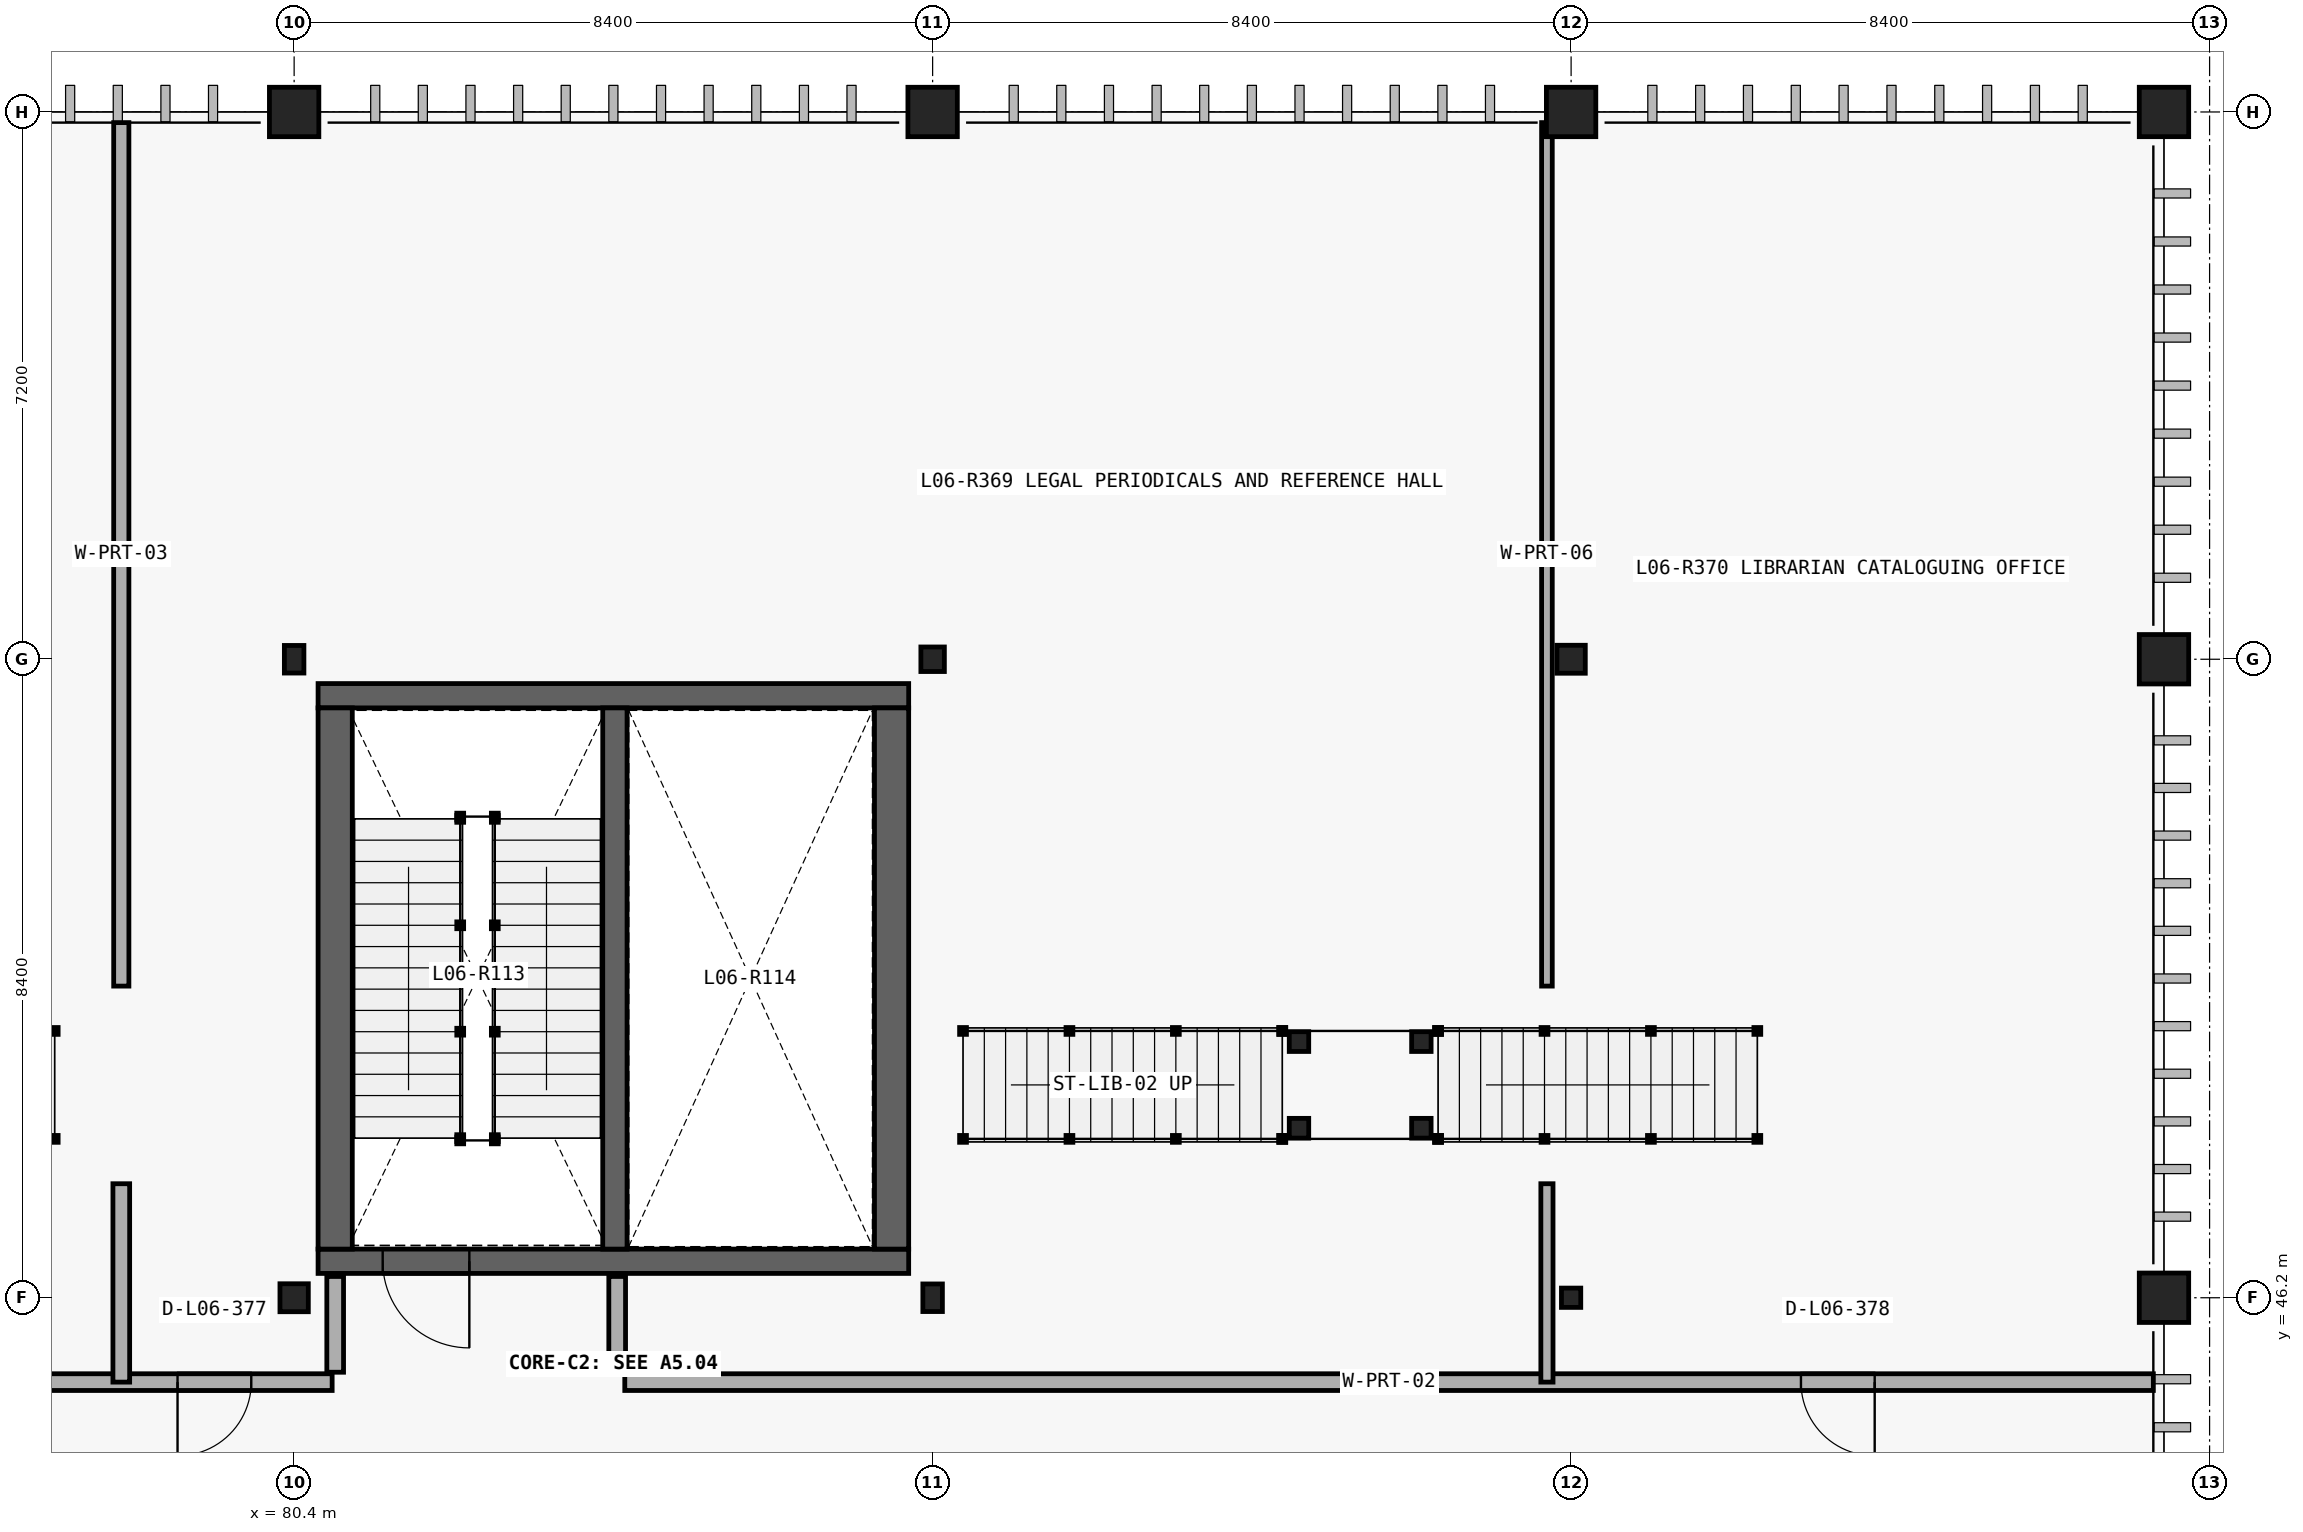
"""IFC4 building model, lengths in metres.
Left out: names, types, materials, properties, quantities, classifications, styles, units other than length and angle.
Written with IfcOpenShell. Run it as: python <this file> out.ifc"""

import sys

from ifc_helpers import new_model, si_unit, direction, frame, frame_2d, origin_with_axes, origin_2d_with_axis, place, context, subcontext, project, spatial, rectangle, hollow_rectangle, circle, i_section, extrude, element, fill, save


model = new_model("IFC4")
c1 = context("Model", 3, precision=1e-05, world=origin_with_axes(), true_north=direction((0.0, 1.0)))
c2 = subcontext(c1, "Body", "Model", "MODEL_VIEW")
j1 = project(units=[si_unit("LENGTHUNIT", "METRE"), si_unit("PLANEANGLEUNIT", "RADIAN")], contexts=[c1])
p1 = place(None, origin_with_axes())
s1 = spatial("IfcSite", under=j1, at=p1, CompositionType="ELEMENT")
p2 = place(p1, origin_with_axes())
s2 = spatial("IfcBuilding", under=s1, at=p2, CompositionType="ELEMENT")
p3 = place(p2, frame((0.0, 0.0, 29.7), z_axis=(0.0, 0.0, 1.0), x_axis=(1.0, 0.0, 0.0)))
s3 = spatial("IfcBuildingStorey", under=s2, at=p3, CompositionType="ELEMENT", Elevation=29.7)
p4 = place(None, frame((80.715, 46.68, 29.7), z_axis=(0.0, 0.0, 1.0), x_axis=(1.0, 0.0, 0.0)))
e1 = element("IfcWall", 1, at=p4, inside=s3, PredefinedType="SHEAR", context=c2, shape_type="SweptSolid", body=[
    extrude(rectangle(XDim=7.77, YDim=0.32, at=frame_2d((3.885, 0.0), x_axis=(1.0, 0.0))), origin_with_axes(), (0.0, 0.0, 1.0), 4.8),
])
p5 = place(None, frame((82.135, 46.68, 29.7), z_axis=(0.0, 0.0, 1.0), x_axis=(1.0, 0.0, 0.0)))
e2 = element("IfcOpeningElement", 2, at=p5, cuts=e1, PredefinedType="OPENING", context=c2, shape_type="SweptSolid", body=[
    extrude(rectangle(XDim=1.14, YDim=2.18, at=frame_2d((0.0, 1.09), x_axis=(1.0, 0.0))), frame((0.0, 0.17, 0.0), z_axis=(0.0, -1.0, 0.0), x_axis=(1.0, 0.0, 0.0)), (0.0, 0.0, 1.0), 0.34),
])
p6 = place(None, frame((88.485, 54.12, 29.7), z_axis=(0.0, 0.0, 1.0), x_axis=(-1.0, 0.0, 0.0)))
e3 = element("IfcWall", 3, at=p6, inside=s3, PredefinedType="SHEAR", context=c2, shape_type="SweptSolid", body=[
    extrude(rectangle(XDim=7.77, YDim=0.32, at=frame_2d((3.885, 0.0), x_axis=(1.0, 0.0))), origin_with_axes(), (0.0, 0.0, 1.0), 4.8),
])
for number, where, z_axis, x_axis in (
    (4, (88.26, 46.84, 29.7), (0.0, 0.0, 1.0), (0.0, 1.0, 0.0)),
    (5, (80.94, 53.96, 29.7), (0.0, 0.0, 1.0), (0.0, -1.0, 0.0)),
):
    element("IfcWall", number, at=place(None, frame(where, z_axis=z_axis, x_axis=x_axis)), inside=s3, PredefinedType="SHEAR", context=c2, shape_type="SweptSolid", body=[
        extrude(rectangle(XDim=7.12, YDim=0.45, at=frame_2d((3.56, 0.0), x_axis=(1.0, 0.0))), origin_with_axes(), (0.0, 0.0, 1.0), 4.8),
    ])
p7 = place(None, frame((84.62, 46.84, 29.7), z_axis=(0.0, 0.0, 1.0), x_axis=(0.0, 1.0, 0.0)))
e6 = element("IfcWall", 6, at=p7, inside=s3, PredefinedType="SHEAR", context=c2, shape_type="SweptSolid", body=[
    extrude(rectangle(XDim=7.12, YDim=0.32, at=frame_2d((3.56, 0.0), x_axis=(1.0, 0.0))), origin_with_axes(), (0.0, 0.0, 1.0), 4.8),
])
for number, where, z_axis, x_axis in (
    (7, (80.94, 45.22, 29.7), (0.0, 0.0, 1.0), (0.0, 1.0, 0.0)),
    (8, (84.65, 45.22, 29.7), (0.0, 0.0, 1.0), (0.0, 1.0, 0.0)),
):
    element("IfcWall", number, at=place(None, frame(where, z_axis=z_axis, x_axis=x_axis)), inside=s3, PredefinedType="PARTITIONING", context=c2, shape_type="SweptSolid", body=[
        extrude(rectangle(XDim=1.26, YDim=0.22, at=frame_2d((0.63, 0.0), x_axis=(1.0, 0.0))), origin_with_axes(), (0.0, 0.0, 1.0), 4.48),
    ])
p8 = place(None, frame((66.755, 45.09, 29.7), z_axis=(0.0, 0.0, 1.0), x_axis=(1.0, 0.0, 0.0)))
e9 = element("IfcWall", 9, at=p8, inside=s3, PredefinedType="PARTITIONING", context=c2, shape_type="SweptSolid", body=[
    extrude(rectangle(XDim=14.145, YDim=0.22, at=frame_2d((7.072, 0.0), x_axis=(1.0, 0.0))), origin_with_axes(), (0.0, 0.0, 1.0), 4.48),
])
p9 = place(None, frame((73.252, 45.09, 29.7), z_axis=(0.0, 0.0, 1.0), x_axis=(1.0, 0.0, 0.0)))
e10 = element("IfcOpeningElement", 10, at=p9, cuts=e9, PredefinedType="OPENING", context=c2, shape_type="SweptSolid", body=[
    extrude(rectangle(XDim=0.97, YDim=2.26, at=frame_2d((0.0, 1.13), x_axis=(1.0, 0.0))), frame((0.0, 0.12, 0.0), z_axis=(0.0, -1.0, 0.0), x_axis=(1.0, 0.0, 0.0)), (0.0, 0.0, 1.0), 0.24),
])
p10 = place(None, frame((79.351, 45.09, 29.7), z_axis=(0.0, 0.0, 1.0), x_axis=(1.0, 0.0, 0.0)))
e11 = element("IfcOpeningElement", 11, at=p10, cuts=e9, PredefinedType="OPENING", context=c2, shape_type="SweptSolid", body=[
    extrude(rectangle(XDim=0.97, YDim=2.26, at=frame_2d((0.0, 1.13), x_axis=(1.0, 0.0))), frame((0.0, 0.12, 0.0), z_axis=(0.0, -1.0, 0.0), x_axis=(1.0, 0.0, 0.0)), (0.0, 0.0, 1.0), 0.24),
])
p11 = place(None, frame((76.092, 45.09, 30.75), z_axis=(0.0, 0.0, 1.0), x_axis=(1.0, 0.0, 0.0)))
e12 = element("IfcOpeningElement", 12, at=p11, cuts=e9, PredefinedType="OPENING", context=c2, shape_type="SweptSolid", body=[
    extrude(rectangle(XDim=1.55, YDim=1.35, at=frame_2d((0.0, 0.675), x_axis=(1.0, 0.0))), frame((0.0, 0.12, 0.0), z_axis=(0.0, -1.0, 0.0), x_axis=(1.0, 0.0, 0.0)), (0.0, 0.0, 1.0), 0.24),
])
p12 = place(None, frame((84.75, 45.09, 29.7), z_axis=(0.0, 0.0, 1.0), x_axis=(1.0, 0.0, 0.0)))
e13 = element("IfcWall", 13, at=p12, inside=s3, PredefinedType="PARTITIONING", context=c2, shape_type="SweptSolid", body=[
    extrude(rectangle(XDim=20.11, YDim=0.22, at=frame_2d((10.055, 0.0), x_axis=(1.0, 0.0))), origin_with_axes(), (0.0, 0.0, 1.0), 4.48),
])
p13 = place(None, frame((100.709, 45.09, 29.7), z_axis=(0.0, 0.0, 1.0), x_axis=(1.0, 0.0, 0.0)))
e14 = element("IfcOpeningElement", 14, at=p13, cuts=e13, PredefinedType="OPENING", context=c2, shape_type="SweptSolid", body=[
    extrude(rectangle(XDim=0.97, YDim=2.26, at=frame_2d((0.0, 1.13), x_axis=(1.0, 0.0))), frame((0.0, 0.12, 0.0), z_axis=(0.0, -1.0, 0.0), x_axis=(1.0, 0.0, 0.0)), (0.0, 0.0, 1.0), 0.24),
])
p14 = place(None, frame((78.126, 45.09, 29.7), z_axis=(0.0, 0.0, 1.0), x_axis=(0.0, 1.0, 0.0)))
e15 = element("IfcWall", 15, at=p14, inside=s3, PredefinedType="PARTITIONING", context=c2, shape_type="SweptSolid", body=[
    extrude(rectangle(XDim=2.61, YDim=0.22, at=frame_2d((1.305, 0.0), x_axis=(1.0, 0.0))), origin_with_axes(), (0.0, 0.0, 1.0), 4.48),
])
p15 = place(None, frame((78.126, 50.3, 29.7), z_axis=(0.0, 0.0, 1.0), x_axis=(0.0, 1.0, 0.0)))
e16 = element("IfcWall", 16, at=p15, inside=s3, PredefinedType="PARTITIONING", context=c2, shape_type="SweptSolid", body=[
    extrude(rectangle(XDim=11.36, YDim=0.2, at=frame_2d((5.68, 0.0), x_axis=(1.0, 0.0))), origin_with_axes(), (0.0, 0.0, 1.0), 4.48),
])
p16 = place(None, frame((96.882, 45.09, 29.7), z_axis=(0.0, 0.0, 1.0), x_axis=(0.0, 1.0, 0.0)))
e17 = element("IfcWall", 17, at=p16, inside=s3, PredefinedType="PARTITIONING", context=c2, shape_type="SweptSolid", body=[
    extrude(rectangle(XDim=2.61, YDim=0.16, at=frame_2d((1.305, 0.0), x_axis=(1.0, 0.0))), origin_with_axes(), (0.0, 0.0, 1.0), 4.48),
])
p17 = place(None, frame((96.882, 50.3, 29.7), z_axis=(0.0, 0.0, 1.0), x_axis=(0.0, 1.0, 0.0)))
e18 = element("IfcWall", 18, at=p17, inside=s3, PredefinedType="PARTITIONING", context=c2, shape_type="SweptSolid", body=[
    extrude(rectangle(XDim=11.36, YDim=0.14, at=frame_2d((5.68, 0.0), x_axis=(1.0, 0.0))), origin_with_axes(), (0.0, 0.0, 1.0), 4.48),
])
p18 = place(None, frame((80.4, 46.2, 29.7), z_axis=(0.0, 0.0, 1.0), x_axis=(1.0, 0.0, 0.0)))
e19 = element("IfcColumn", 19, at=p18, inside=s3, PredefinedType="COLUMN", context=c2, shape_type="SweptSolid", body=[
    extrude(i_section(OverallWidth=0.373, OverallDepth=0.368, WebThickness=0.015, FlangeThickness=0.024, at=origin_2d_with_axis()), origin_with_axes(), (0.0, 0.0, 1.0), 4.8),
])
p19 = place(None, frame((80.4, 54.6, 29.7), z_axis=(0.0, 0.0, 1.0), x_axis=(1.0, 0.0, 0.0)))
e20 = element("IfcColumn", 20, at=p19, inside=s3, PredefinedType="COLUMN", context=c2, shape_type="SweptSolid", body=[
    extrude(i_section(OverallWidth=0.257, OverallDepth=0.363, WebThickness=0.013, FlangeThickness=0.022, at=origin_2d_with_axis()), origin_with_axes(), (0.0, 0.0, 1.0), 4.8),
])
p20 = place(None, frame((80.4, 61.8, 29.7), z_axis=(0.0, 0.0, 1.0), x_axis=(1.0, 0.0, 0.0)))
e21 = element("IfcColumn", 21, at=p20, inside=s3, PredefinedType="COLUMN", context=c2, shape_type="SweptSolid", body=[
    extrude(circle(Radius=0.325, at=origin_2d_with_axis()), origin_with_axes(), (0.0, 0.0, 1.0), 4.8),
])
p21 = place(None, frame((88.8, 46.2, 29.7), z_axis=(0.0, 0.0, 1.0), x_axis=(1.0, 0.0, 0.0)))
e22 = element("IfcColumn", 22, at=p21, inside=s3, PredefinedType="COLUMN", context=c2, shape_type="SweptSolid", body=[
    extrude(i_section(OverallWidth=0.257, OverallDepth=0.363, WebThickness=0.013, FlangeThickness=0.022, at=origin_2d_with_axis()), origin_with_axes(), (0.0, 0.0, 1.0), 4.8),
])
p22 = place(None, frame((88.8, 54.6, 29.7), z_axis=(0.0, 0.0, 1.0), x_axis=(1.0, 0.0, 0.0)))
e23 = element("IfcColumn", 23, at=p22, inside=s3, PredefinedType="COLUMN", context=c2, shape_type="SweptSolid", body=[
    extrude(i_section(OverallWidth=0.309, OverallDepth=0.323, WebThickness=0.014, FlangeThickness=0.023, at=origin_2d_with_axis()), origin_with_axes(), (0.0, 0.0, 1.0), 4.8),
])
p23 = place(None, frame((88.8, 61.8, 29.7), z_axis=(0.0, 0.0, 1.0), x_axis=(1.0, 0.0, 0.0)))
e24 = element("IfcColumn", 24, at=p23, inside=s3, PredefinedType="COLUMN", context=c2, shape_type="SweptSolid", body=[
    extrude(circle(Radius=0.325, at=origin_2d_with_axis()), origin_with_axes(), (0.0, 0.0, 1.0), 4.8),
])
p24 = place(None, frame((97.2, 46.2, 29.7), z_axis=(0.0, 0.0, 1.0), x_axis=(1.0, 0.0, 0.0)))
e25 = element("IfcColumn", 25, at=p24, inside=s3, PredefinedType="COLUMN", context=c2, shape_type="SweptSolid", body=[
    extrude(hollow_rectangle(XDim=0.254, YDim=0.254, WallThickness=0.013, InnerFilletRadius=0.025, OuterFilletRadius=0.013, at=origin_2d_with_axis()), origin_with_axes(), (0.0, 0.0, 1.0), 4.8),
])
p25 = place(None, frame((97.2, 54.6, 29.7), z_axis=(0.0, 0.0, 1.0), x_axis=(1.0, 0.0, 0.0)))
e26 = element("IfcColumn", 26, at=p25, inside=s3, PredefinedType="COLUMN", context=c2, shape_type="SweptSolid", body=[
    extrude(i_section(OverallWidth=0.373, OverallDepth=0.368, WebThickness=0.015, FlangeThickness=0.024, at=origin_2d_with_axis()), origin_with_axes(), (0.0, 0.0, 1.0), 4.8),
])
for number, where, z_axis, x_axis in (
    (27, (97.2, 61.8, 29.7), (0.0, 0.0, 1.0), (1.0, 0.0, 0.0)),
    (28, (105.0, 46.2, 29.7), (0.0, 0.0, 1.0), (1.0, 0.0, 0.0)),
    (29, (105.0, 54.6, 29.7), (0.0, 0.0, 1.0), (1.0, 0.0, 0.0)),
    (30, (105.0, 61.8, 29.7), (0.0, 0.0, 1.0), (1.0, 0.0, 0.0)),
):
    element("IfcColumn", number, at=place(None, frame(where, z_axis=z_axis, x_axis=x_axis)), inside=s3, PredefinedType="COLUMN", context=c2, shape_type="SweptSolid", body=[
        extrude(circle(Radius=0.325, at=origin_2d_with_axis()), origin_with_axes(), (0.0, 0.0, 1.0), 4.8),
    ])
for number, where, z_axis, x_axis in (
    (31, (93.62, 48.43, 29.36), (0.0, 0.0, 1.0), (1.0, 0.0, 0.0)),
    (32, (93.62, 49.57, 29.36), (0.0, 0.0, 1.0), (1.0, 0.0, 0.0)),
    (33, (95.23, 48.43, 29.36), (0.0, 0.0, 1.0), (1.0, 0.0, 0.0)),
    (34, (95.23, 49.57, 29.36), (0.0, 0.0, 1.0), (1.0, 0.0, 0.0)),
):
    element("IfcColumn", number, at=place(None, frame(where, z_axis=z_axis, x_axis=x_axis)), inside=s3, PredefinedType="COLUMN", context=c2, shape_type="SweptSolid", body=[
        extrude(i_section(OverallWidth=0.256, OverallDepth=0.26, WebThickness=0.011, FlangeThickness=0.017, at=origin_2d_with_axis()), origin_with_axes(), (0.0, 0.0, 1.0), 2.56),
    ])
p26 = place(None, frame((82.135, 46.68, 29.7), z_axis=(0.0, 0.0, 1.0), x_axis=(-1.0, 0.0, 0.0)))
e35 = element("IfcDoor", 35, at=p26, inside=s3, OperationType="SINGLE_SWING_RIGHT", PredefinedType="DOOR", context=c2, shape_type="SweptSolid", body=[
    extrude(rectangle(XDim=1.14, YDim=2.18, at=frame_2d((0.0, 1.09), x_axis=(1.0, 0.0))), frame((0.0, 0.04, 0.0), z_axis=(0.0, -1.0, 0.0), x_axis=(1.0, 0.0, 0.0)), (0.0, 0.0, 1.0), 0.08),
])
fill(e2, e35)
p27 = place(None, frame((79.351, 45.09, 29.7), z_axis=(0.0, 0.0, 1.0), x_axis=(-1.0, 0.0, 0.0)))
e36 = element("IfcDoor", 36, at=p27, inside=s3, OperationType="SINGLE_SWING_LEFT", PredefinedType="DOOR", context=c2, shape_type="SweptSolid", body=[
    extrude(rectangle(XDim=0.97, YDim=2.26, at=frame_2d((0.0, 1.13), x_axis=(1.0, 0.0))), frame((0.0, 0.04, 0.0), z_axis=(0.0, -1.0, 0.0), x_axis=(1.0, 0.0, 0.0)), (0.0, 0.0, 1.0), 0.08),
])
fill(e11, e36)
p28 = place(None, frame((100.709, 45.09, 29.7), z_axis=(0.0, 0.0, 1.0), x_axis=(-1.0, 0.0, 0.0)))
e37 = element("IfcDoor", 37, at=p28, inside=s3, OperationType="SINGLE_SWING_RIGHT", PredefinedType="DOOR", context=c2, shape_type="SweptSolid", body=[
    extrude(rectangle(XDim=0.97, YDim=2.26, at=frame_2d((0.0, 1.13), x_axis=(1.0, 0.0))), frame((0.0, 0.04, 0.0), z_axis=(0.0, -1.0, 0.0), x_axis=(1.0, 0.0, 0.0)), (0.0, 0.0, 1.0), 0.08),
])
fill(e14, e37)
save(model, sys.argv[1])
